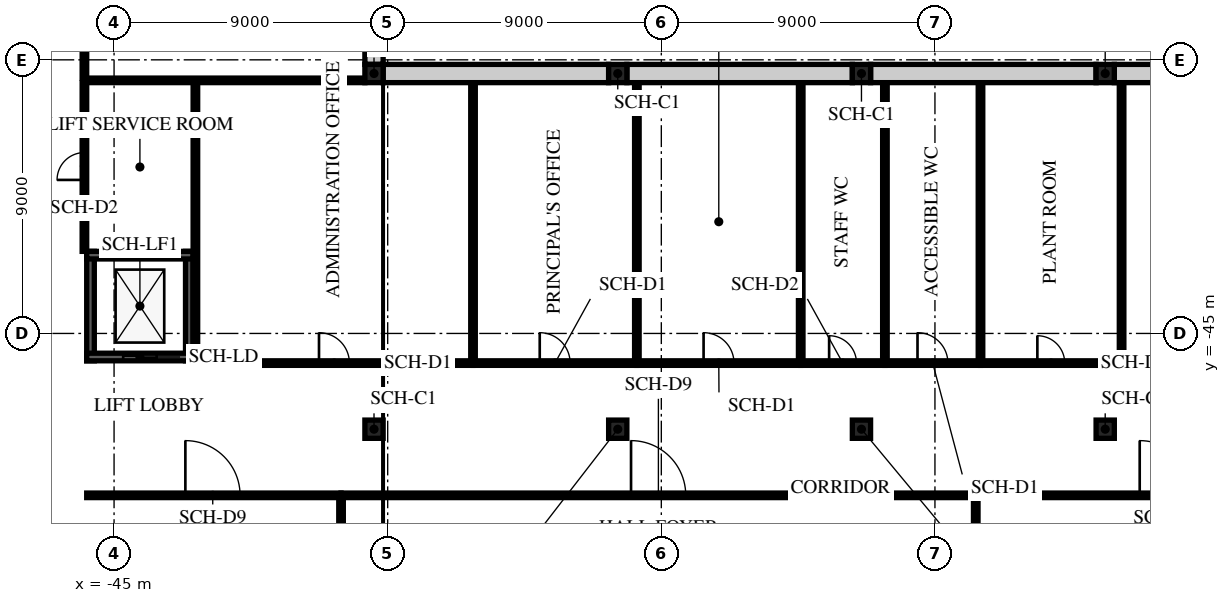
"""IFC4 building model, lengths in metres.
Left out: names, types, materials, properties, quantities, classifications, styles, units other than length and angle.
Written with IfcOpenShell. Run it as: python <this file> out.ifc"""

import sys

from ifc_helpers import new_model, si_unit, direction, frame, frame_2d, origin, origin_2d, place, context, subcontext, project, spatial, rectangle, extrude, element, fill, save


model = new_model("IFC4")
c1 = context("Model", 3, precision=1e-05, world=origin(), true_north=direction((0.0, 1.0)))
c2 = subcontext(c1, "Body", "Model", "MODEL_VIEW")
j1 = project(units=[si_unit("LENGTHUNIT", "METRE"), si_unit("PLANEANGLEUNIT", "RADIAN")], contexts=[c1])
p1 = place(None, origin())
s1 = spatial("IfcSite", under=j1, at=p1, CompositionType="ELEMENT")
p2 = place(p1, origin())
s2 = spatial("IfcBuilding", under=s1, at=p2, CompositionType="ELEMENT")
p3 = place(p2, origin())
s3 = spatial("IfcBuildingStorey", under=s2, at=p3, CompositionType="ELEMENT", Elevation=0.0)
p4 = place(p3, frame((-18.0, -36.0, 0.0), z_axis=(0.0, 0.0, 1.0), x_axis=(0.0, 1.0, 0.0)))
e1 = element("IfcWall", 1, at=p4, inside=s3, PredefinedType="PARTITIONING", context=c2, shape_type="SweptSolid", body=[
    extrude(rectangle(XDim=0.9, YDim=0.1, at=frame_2d((0.45, 0.0))), origin(), (0.0, 0.0, 1.0), 4.1),
])
p5 = place(p3, frame((-13.5, -36.0, 0.0), z_axis=(0.0, 0.0, 1.0), x_axis=(0.0, 1.0, 0.0)))
e2 = element("IfcWall", 2, at=p5, inside=s3, PredefinedType="PARTITIONING", context=c2, shape_type="SweptSolid", body=[
    extrude(rectangle(XDim=17.925, YDim=0.1, at=frame_2d((8.962, 0.0))), origin(), (0.0, 0.0, 1.0), 4.1),
])
for number, where, z_axis, x_axis in (
    (3, (-45.775, -45.9, -1.5), (0.0, 0.0, 1.0), (0.0, 1.0, 0.0)),
    (4, (-42.525, -45.9, -1.5), (0.0, 0.0, 1.0), (0.0, 1.0, 0.0)),
):
    element("IfcWall", number, at=place(p3, frame(where, z_axis=z_axis, x_axis=x_axis)), inside=s3, PredefinedType="SHEAR", context=c2, shape_type="SweptSolid", body=[
        extrude(rectangle(XDim=3.6, YDim=0.25, at=frame_2d((1.8, 0.0))), origin(), (0.0, 0.0, 1.0), 6.0),
    ])
p6 = place(p3, frame((-45.9, -42.425, -1.5), z_axis=(0.0, 0.0, 1.0), x_axis=(1.0, 0.0, 0.0)))
e5 = element("IfcWall", 5, at=p6, inside=s3, PredefinedType="SHEAR", context=c2, shape_type="SweptSolid", body=[
    extrude(rectangle(XDim=3.5, YDim=0.25, at=frame_2d((1.75, 0.0))), origin(), (0.0, 0.0, 1.0), 6.0),
])
p7 = place(p3, frame((-45.9, -45.775, -1.5), z_axis=(0.0, 0.0, 1.0), x_axis=(1.0, 0.0, 0.0)))
e6 = element("IfcWall", 6, at=p7, inside=s3, PredefinedType="SHEAR", context=c2, shape_type="SweptSolid", body=[
    extrude(rectangle(XDim=3.5, YDim=0.25, at=frame_2d((1.75, 0.0))), origin(), (0.0, 0.0, 1.0), 6.0),
])
p8 = place(p7, frame((1.2, 0.0, 1.5)))
e7 = element("IfcOpeningElement", 7, at=p8, cuts=e6, PredefinedType="OPENING", context=c2, shape_type="SweptSolid", body=[
    extrude(rectangle(XDim=1.1, YDim=2.1, at=frame_2d((0.55, 1.05))), frame((0.0, 0.135, 0.0), z_axis=(0.0, -1.0, 0.0), x_axis=(1.0, 0.0, 0.0)), (0.0, 0.0, 1.0), 0.27),
])
for number, where, z_axis, x_axis in (
    (8, (-36.45, -48.15, -0.2), (0.0, 0.0, 1.0), (1.0, 0.0, 0.0)),
    (9, (-36.45, -36.45, -0.2), (0.0, 0.0, 1.0), (1.0, 0.0, 0.0)),
    (10, (-28.433, -48.15, -0.2), (0.0, 0.0, 1.0), (1.0, 0.0, 0.0)),
    (11, (-28.433, -36.45, -0.2), (0.0, 0.0, 1.0), (1.0, 0.0, 0.0)),
    (12, (-20.417, -48.15, -0.2), (0.0, 0.0, 1.0), (1.0, 0.0, 0.0)),
    (13, (-20.417, -36.45, -0.2), (0.0, 0.0, 1.0), (1.0, 0.0, 0.0)),
    (14, (-12.4, -48.15, -0.2), (0.0, 0.0, 1.0), (1.0, 0.0, 0.0)),
    (15, (-12.4, -36.45, -0.2), (0.0, 0.0, 1.0), (1.0, 0.0, 0.0)),
):
    element("IfcColumn", number, at=place(p3, frame(where, z_axis=z_axis, x_axis=x_axis)), inside=s3, PredefinedType="COLUMN", context=c2, shape_type="SweptSolid", body=[
        extrude(rectangle(XDim=0.6, YDim=0.6, at=origin_2d()), origin(), (0.0, 0.0, 1.0), 4.7),
    ])
p9 = place(p3, frame((-45.975, -36.6, 0.0), z_axis=(0.0, 0.0, 1.0), x_axis=(0.0, 1.0, 0.0)))
e16 = element("IfcWall", 16, at=p9, inside=s3, PredefinedType="PARTITIONING", context=c2, shape_type="SweptSolid", body=[
    extrude(rectangle(XDim=7.087, YDim=0.15, at=frame_2d((3.543, 0.0))), origin(), (0.0, 0.0, 1.0), 4.1),
])
p10 = place(p9, frame((3.056, 0.0, 0.0)))
e17 = element("IfcOpeningElement", 17, at=p10, cuts=e16, PredefinedType="OPENING", context=c2, shape_type="SweptSolid", body=[
    extrude(rectangle(XDim=0.9, YDim=2.1, at=frame_2d((0.45, 1.05))), frame((0.0, 0.085, 0.0), z_axis=(0.0, -1.0, 0.0), x_axis=(1.0, 0.0, 0.0)), (0.0, 0.0, 1.0), 0.17),
])
for number, where, z_axis, x_axis in (
    (18, (-37.534, -59.55, 0.0), (0.0, 0.0, 1.0), (0.0, 1.0, 0.0)),
    (19, (-16.658, -59.55, 0.0), (0.0, 0.0, 1.0), (0.0, 1.0, 0.0)),
):
    element("IfcWall", number, at=place(p3, frame(where, z_axis=z_axis, x_axis=x_axis)), inside=s3, PredefinedType="PARTITIONING", context=c2, shape_type="SweptSolid", body=[
        extrude(rectangle(XDim=9.15, YDim=0.15, at=frame_2d((4.575, 0.0))), origin(), (0.0, 0.0, 1.0), 4.1),
    ])
p11 = place(p3, frame((-45.9, -50.325, 0.0), z_axis=(0.0, 0.0, 1.0), x_axis=(1.0, 0.0, 0.0)))
e20 = element("IfcWall", 20, at=p11, inside=s3, PredefinedType="PARTITIONING", context=c2, shape_type="SweptSolid", body=[
    extrude(rectangle(XDim=8.365, YDim=0.15, at=frame_2d((4.183, 0.0))), origin(), (0.0, 0.0, 1.0), 4.1),
])
p12 = place(p11, frame((3.245, 0.0, 0.0)))
e21 = element("IfcOpeningElement", 21, at=p12, cuts=e20, PredefinedType="OPENING", context=c2, shape_type="SweptSolid", body=[
    extrude(rectangle(XDim=1.8, YDim=2.4, at=frame_2d((0.9, 1.2))), frame((0.0, 0.085, 0.0), z_axis=(0.0, -1.0, 0.0), x_axis=(1.0, 0.0, 0.0)), (0.0, 0.0, 1.0), 0.17),
])
p13 = place(p3, frame((-37.534, -50.325, 0.0), z_axis=(0.0, 0.0, 1.0), x_axis=(1.0, 0.0, 0.0)))
e22 = element("IfcWall", 22, at=p13, inside=s3, PredefinedType="PARTITIONING", context=c2, shape_type="SweptSolid", body=[
    extrude(rectangle(XDim=20.876, YDim=0.15, at=frame_2d((10.438, 0.0))), origin(), (0.0, 0.0, 1.0), 4.1),
])
p14 = place(p13, frame((9.538, 0.0, 0.0)))
e23 = element("IfcOpeningElement", 23, at=p14, cuts=e22, PredefinedType="OPENING", context=c2, shape_type="SweptSolid", body=[
    extrude(rectangle(XDim=1.8, YDim=2.4, at=frame_2d((0.9, 1.2))), frame((0.0, 0.085, 0.0), z_axis=(0.0, -1.0, 0.0), x_axis=(1.0, 0.0, 0.0)), (0.0, 0.0, 1.0), 0.17),
])
p15 = place(p3, frame((-16.658, -50.325, 0.0), z_axis=(0.0, 0.0, 1.0), x_axis=(1.0, 0.0, 0.0)))
e24 = element("IfcWall", 24, at=p15, inside=s3, PredefinedType="PARTITIONING", context=c2, shape_type="SweptSolid", body=[
    extrude(rectangle(XDim=12.636, YDim=0.15, at=frame_2d((6.318, 0.0))), origin(), (0.0, 0.0, 1.0), 4.1),
])
p16 = place(p15, frame((5.393, 0.0, 0.0)))
e25 = element("IfcOpeningElement", 25, at=p16, cuts=e24, PredefinedType="OPENING", context=c2, shape_type="SweptSolid", body=[
    extrude(rectangle(XDim=1.8, YDim=2.4, at=frame_2d((0.9, 1.2))), frame((0.0, 0.085, 0.0), z_axis=(0.0, -1.0, 0.0), x_axis=(1.0, 0.0, 0.0)), (0.0, 0.0, 1.0), 0.17),
])
for number, where, z_axis, x_axis in (
    (26, (-33.194, -45.9, 0.0), (0.0, 0.0, 1.0), (0.0, 1.0, 0.0)),
    (27, (-27.804, -45.9, 0.0), (0.0, 0.0, 1.0), (0.0, 1.0, 0.0)),
    (28, (-22.415, -45.9, 0.0), (0.0, 0.0, 1.0), (0.0, 1.0, 0.0)),
    (29, (-19.646, -45.9, 0.0), (0.0, 0.0, 1.0), (0.0, 1.0, 0.0)),
    (30, (-16.502, -45.9, 0.0), (0.0, 0.0, 1.0), (0.0, 1.0, 0.0)),
    (31, (-11.861, -45.9, 0.0), (0.0, 0.0, 1.0), (0.0, 1.0, 0.0)),
):
    element("IfcWall", number, at=place(p3, frame(where, z_axis=z_axis, x_axis=x_axis)), inside=s3, PredefinedType="PARTITIONING", context=c2, shape_type="SweptSolid", body=[
        extrude(rectangle(XDim=9.15, YDim=0.15, at=frame_2d((4.575, 0.0))), origin(), (0.0, 0.0, 1.0), 4.1),
    ])
p17 = place(p3, frame((-42.25, -45.975, 0.0), z_axis=(0.0, 0.0, 1.0), x_axis=(1.0, 0.0, 0.0)))
e32 = element("IfcWall", 32, at=p17, inside=s3, PredefinedType="PARTITIONING", context=c2, shape_type="SweptSolid", body=[
    extrude(rectangle(XDim=9.056, YDim=0.15, at=frame_2d((4.528, 0.0))), origin(), (0.0, 0.0, 1.0), 4.1),
])
p18 = place(p17, frame((3.991, 0.0, 0.0)))
e33 = element("IfcOpeningElement", 33, at=p18, cuts=e32, PredefinedType="OPENING", context=c2, shape_type="SweptSolid", body=[
    extrude(rectangle(XDim=1.0, YDim=2.1, at=frame_2d((0.5, 1.05))), frame((0.0, 0.085, 0.0), z_axis=(0.0, -1.0, 0.0), x_axis=(1.0, 0.0, 0.0)), (0.0, 0.0, 1.0), 0.17),
])
p19 = place(p3, frame((-33.194, -45.975, 0.0), z_axis=(0.0, 0.0, 1.0), x_axis=(1.0, 0.0, 0.0)))
e34 = element("IfcWall", 34, at=p19, inside=s3, PredefinedType="PARTITIONING", context=c2, shape_type="SweptSolid", body=[
    extrude(rectangle(XDim=5.389, YDim=0.15, at=frame_2d((2.695, 0.0))), origin(), (0.0, 0.0, 1.0), 4.1),
])
p20 = place(p19, frame((2.195, 0.0, 0.0)))
e35 = element("IfcOpeningElement", 35, at=p20, cuts=e34, PredefinedType="OPENING", context=c2, shape_type="SweptSolid", body=[
    extrude(rectangle(XDim=1.0, YDim=2.1, at=frame_2d((0.5, 1.05))), frame((0.0, 0.085, 0.0), z_axis=(0.0, -1.0, 0.0), x_axis=(1.0, 0.0, 0.0)), (0.0, 0.0, 1.0), 0.17),
])
p21 = place(p3, frame((-27.804, -45.975, 0.0), z_axis=(0.0, 0.0, 1.0), x_axis=(1.0, 0.0, 0.0)))
e36 = element("IfcWall", 36, at=p21, inside=s3, PredefinedType="PARTITIONING", context=c2, shape_type="SweptSolid", body=[
    extrude(rectangle(XDim=5.389, YDim=0.15, at=frame_2d((2.695, 0.0))), origin(), (0.0, 0.0, 1.0), 4.1),
])
p22 = place(p21, frame((2.195, 0.0, 0.0)))
e37 = element("IfcOpeningElement", 37, at=p22, cuts=e36, PredefinedType="OPENING", context=c2, shape_type="SweptSolid", body=[
    extrude(rectangle(XDim=1.0, YDim=2.1, at=frame_2d((0.5, 1.05))), frame((0.0, 0.085, 0.0), z_axis=(0.0, -1.0, 0.0), x_axis=(1.0, 0.0, 0.0)), (0.0, 0.0, 1.0), 0.17),
])
p23 = place(p3, frame((-22.415, -45.975, 0.0), z_axis=(0.0, 0.0, 1.0), x_axis=(1.0, 0.0, 0.0)))
e38 = element("IfcWall", 38, at=p23, inside=s3, PredefinedType="PARTITIONING", context=c2, shape_type="SweptSolid", body=[
    extrude(rectangle(XDim=2.77, YDim=0.15, at=frame_2d((1.385, 0.0))), origin(), (0.0, 0.0, 1.0), 4.1),
])
p24 = place(p23, frame((0.935, 0.0, 0.0)))
e39 = element("IfcOpeningElement", 39, at=p24, cuts=e38, PredefinedType="OPENING", context=c2, shape_type="SweptSolid", body=[
    extrude(rectangle(XDim=0.9, YDim=2.1, at=frame_2d((0.45, 1.05))), frame((0.0, 0.085, 0.0), z_axis=(0.0, -1.0, 0.0), x_axis=(1.0, 0.0, 0.0)), (0.0, 0.0, 1.0), 0.17),
])
p25 = place(p3, frame((-19.646, -45.975, 0.0), z_axis=(0.0, 0.0, 1.0), x_axis=(1.0, 0.0, 0.0)))
e40 = element("IfcWall", 40, at=p25, inside=s3, PredefinedType="PARTITIONING", context=c2, shape_type="SweptSolid", body=[
    extrude(rectangle(XDim=3.144, YDim=0.15, at=frame_2d((1.572, 0.0))), origin(), (0.0, 0.0, 1.0), 4.1),
])
p26 = place(p25, frame((1.072, 0.0, 0.0)))
e41 = element("IfcOpeningElement", 41, at=p26, cuts=e40, PredefinedType="OPENING", context=c2, shape_type="SweptSolid", body=[
    extrude(rectangle(XDim=1.0, YDim=2.1, at=frame_2d((0.5, 1.05))), frame((0.0, 0.085, 0.0), z_axis=(0.0, -1.0, 0.0), x_axis=(1.0, 0.0, 0.0)), (0.0, 0.0, 1.0), 0.17),
])
p27 = place(p3, frame((-16.502, -45.975, 0.0), z_axis=(0.0, 0.0, 1.0), x_axis=(1.0, 0.0, 0.0)))
e42 = element("IfcWall", 42, at=p27, inside=s3, PredefinedType="PARTITIONING", context=c2, shape_type="SweptSolid", body=[
    extrude(rectangle(XDim=4.641, YDim=0.15, at=frame_2d((2.32, 0.0))), origin(), (0.0, 0.0, 1.0), 4.1),
])
p28 = place(p27, frame((1.87, 0.0, 0.0)))
e43 = element("IfcOpeningElement", 43, at=p28, cuts=e42, PredefinedType="OPENING", context=c2, shape_type="SweptSolid", body=[
    extrude(rectangle(XDim=0.9, YDim=2.1, at=frame_2d((0.45, 1.05))), frame((0.0, 0.085, 0.0), z_axis=(0.0, -1.0, 0.0), x_axis=(1.0, 0.0, 0.0)), (0.0, 0.0, 1.0), 0.17),
])
p29 = place(p3, frame((-11.861, -45.975, 0.0), z_axis=(0.0, 0.0, 1.0), x_axis=(1.0, 0.0, 0.0)))
e44 = element("IfcWall", 44, at=p29, inside=s3, PredefinedType="PARTITIONING", context=c2, shape_type="SweptSolid", body=[
    extrude(rectangle(XDim=10.628, YDim=0.15, at=frame_2d((5.314, 0.0))), origin(), (0.0, 0.0, 1.0), 4.1),
])
p30 = place(p29, frame((4.714, 0.0, 0.0)))
e45 = element("IfcOpeningElement", 45, at=p30, cuts=e44, PredefinedType="OPENING", context=c2, shape_type="SweptSolid", body=[
    extrude(rectangle(XDim=1.2, YDim=2.1, at=frame_2d((0.6, 1.05))), frame((0.0, 0.085, 0.0), z_axis=(0.0, -1.0, 0.0), x_axis=(1.0, 0.0, 0.0)), (0.0, 0.0, 1.0), 0.17),
])
p31 = place(p3, frame((-36.45, -29.236, -0.2), z_axis=(0.0, 0.0, 1.0), x_axis=(0.0, -1.0, 0.0)))
e46 = element("IfcWall", 46, at=p31, inside=s3, PredefinedType="STANDARD", context=c2, shape_type="SweptSolid", body=[
    extrude(rectangle(XDim=6.914, YDim=0.6, at=frame_2d((3.457, 0.0))), origin(), (0.0, 0.0, 1.0), 4.3),
])
for number, where, z_axis, x_axis in (
    (47, (-36.15, -36.45, -0.2), (0.0, 0.0, 1.0), (1.0, 0.0, 0.0)),
    (48, (-28.133, -36.45, -0.2), (0.0, 0.0, 1.0), (1.0, 0.0, 0.0)),
):
    element("IfcWall", number, at=place(p3, frame(where, z_axis=z_axis, x_axis=x_axis)), inside=s3, PredefinedType="STANDARD", context=c2, shape_type="SweptSolid", body=[
        extrude(rectangle(XDim=7.417, YDim=0.6, at=frame_2d((3.708, 0.0))), origin(), (0.0, 0.0, 1.0), 4.3),
    ])
for number, where, z_axis, x_axis in (
    (49, (-20.117, -36.45, -0.2), (0.0, 0.0, 1.0), (1.0, 0.0, 0.0)),
    (50, (-12.1, -36.45, -0.2), (0.0, 0.0, 1.0), (1.0, 0.0, 0.0)),
):
    element("IfcWall", number, at=place(p3, frame(where, z_axis=z_axis, x_axis=x_axis)), inside=s3, PredefinedType="STANDARD", context=c2, shape_type="SweptSolid", body=[
        extrude(rectangle(XDim=7.417, YDim=0.6, at=frame_2d((3.708, 0.0))), origin(), (0.0, 0.0, 1.0), 4.3),
    ])
for number, where, z_axis, x_axis in (
    (51, (-45.9, -36.675, 0.0), (0.0, 0.0, 1.0), (1.0, 0.0, 0.0)),
    (52, (-42.325, -45.9, 0.0), (0.0, 0.0, 1.0), (0.0, 1.0, 0.0)),
):
    element("IfcWall", number, at=place(p3, frame(where, z_axis=z_axis, x_axis=x_axis)), inside=s3, PredefinedType="PARTITIONING", context=c2, shape_type="SweptSolid", body=[
        extrude(rectangle(XDim=9.15, YDim=0.15, at=frame_2d((4.575, 0.0))), origin(), (0.0, 0.0, 1.0), 4.1),
    ])
p32 = place(p3, frame((-45.975, -42.3, 0.0), z_axis=(0.0, 0.0, 1.0), x_axis=(0.0, 1.0, 0.0)))
e53 = element("IfcWall", 53, at=p32, inside=s3, PredefinedType="PARTITIONING", context=c2, shape_type="SweptSolid", body=[
    extrude(rectangle(XDim=5.55, YDim=0.15, at=frame_2d((2.775, 0.0))), origin(), (0.0, 0.0, 1.0), 4.1),
])
p33 = place(p32, frame((2.35, 0.0, 0.0)))
e54 = element("IfcOpeningElement", 54, at=p33, cuts=e53, PredefinedType="OPENING", context=c2, shape_type="SweptSolid", body=[
    extrude(rectangle(XDim=0.9, YDim=2.1, at=frame_2d((0.45, 1.05))), frame((0.0, 0.085, 0.0), z_axis=(0.0, -1.0, 0.0), x_axis=(1.0, 0.0, 0.0)), (0.0, 0.0, 1.0), 0.17),
])
p34 = place(p3, frame((-30.876, -35.7, 0.0), z_axis=(0.0, 0.0, 1.0), x_axis=(1.0, 0.0, 0.0)))
e55 = element("IfcWall", 55, at=p34, inside=s3, PredefinedType="STANDARD", context=c2, shape_type="SweptSolid", body=[
    extrude(rectangle(XDim=61.751, YDim=0.6, at=frame_2d((30.876, 0.0))), origin(), (0.0, 0.0, 1.0), 4.1),
])
p35 = place(p3, frame((-35.7, -30.876, 0.0), z_axis=(0.0, 0.0, 1.0), x_axis=(0.707106781187, -0.707106781187, 0.0)))
e56 = element("IfcWall", 56, at=p35, inside=s3, PredefinedType="STANDARD", context=c2, shape_type="SweptSolid", body=[
    extrude(rectangle(XDim=6.823, YDim=0.6, at=frame_2d((3.411, 0.0))), origin(), (0.0, 0.0, 1.0), 4.1),
])
p36 = place(p8, origin())
e57 = element("IfcDoor", 57, at=p36, inside=s3, OperationType="DOUBLE_DOOR_SLIDING", PredefinedType="DOOR", context=c2, shape_type="SweptSolid", body=[
    extrude(rectangle(XDim=1.1, YDim=2.1, at=frame_2d((0.55, 1.05))), frame((0.0, 0.025, 0.0), z_axis=(0.0, -1.0, 0.0), x_axis=(1.0, 0.0, 0.0)), (0.0, 0.0, 1.0), 0.05),
])
fill(e7, e57)
p37 = place(p12, origin())
e58 = element("IfcDoor", 58, at=p37, inside=s3, OperationType="DOUBLE_DOOR_SINGLE_SWING", PredefinedType="DOOR", context=c2, shape_type="SweptSolid", body=[
    extrude(rectangle(XDim=1.8, YDim=2.4, at=frame_2d((0.9, 1.2))), frame((0.0, 0.025, 0.0), z_axis=(0.0, -1.0, 0.0), x_axis=(1.0, 0.0, 0.0)), (0.0, 0.0, 1.0), 0.05),
])
fill(e21, e58)
p38 = place(p14, origin())
e59 = element("IfcDoor", 59, at=p38, inside=s3, OperationType="DOUBLE_DOOR_SINGLE_SWING", PredefinedType="DOOR", context=c2, shape_type="SweptSolid", body=[
    extrude(rectangle(XDim=1.8, YDim=2.4, at=frame_2d((0.9, 1.2))), frame((0.0, 0.025, 0.0), z_axis=(0.0, -1.0, 0.0), x_axis=(1.0, 0.0, 0.0)), (0.0, 0.0, 1.0), 0.05),
])
fill(e23, e59)
p39 = place(p16, origin())
e60 = element("IfcDoor", 60, at=p39, inside=s3, OperationType="DOUBLE_DOOR_SINGLE_SWING", PredefinedType="DOOR", context=c2, shape_type="SweptSolid", body=[
    extrude(rectangle(XDim=1.8, YDim=2.4, at=frame_2d((0.9, 1.2))), frame((0.0, 0.025, 0.0), z_axis=(0.0, -1.0, 0.0), x_axis=(1.0, 0.0, 0.0)), (0.0, 0.0, 1.0), 0.05),
])
fill(e25, e60)
p40 = place(p18, origin())
e61 = element("IfcDoor", 61, at=p40, inside=s3, OperationType="SINGLE_SWING_LEFT", PredefinedType="DOOR", context=c2, shape_type="SweptSolid", body=[
    extrude(rectangle(XDim=1.0, YDim=2.1, at=frame_2d((0.5, 1.05))), frame((0.0, 0.025, 0.0), z_axis=(0.0, -1.0, 0.0), x_axis=(1.0, 0.0, 0.0)), (0.0, 0.0, 1.0), 0.05),
])
fill(e33, e61)
p41 = place(p20, origin())
e62 = element("IfcDoor", 62, at=p41, inside=s3, OperationType="SINGLE_SWING_RIGHT", PredefinedType="DOOR", context=c2, shape_type="SweptSolid", body=[
    extrude(rectangle(XDim=1.0, YDim=2.1, at=frame_2d((0.5, 1.05))), frame((0.0, 0.025, 0.0), z_axis=(0.0, -1.0, 0.0), x_axis=(1.0, 0.0, 0.0)), (0.0, 0.0, 1.0), 0.05),
])
fill(e35, e62)
p42 = place(p22, origin())
e63 = element("IfcDoor", 63, at=p42, inside=s3, OperationType="SINGLE_SWING_LEFT", PredefinedType="DOOR", context=c2, shape_type="SweptSolid", body=[
    extrude(rectangle(XDim=1.0, YDim=2.1, at=frame_2d((0.5, 1.05))), frame((0.0, 0.025, 0.0), z_axis=(0.0, -1.0, 0.0), x_axis=(1.0, 0.0, 0.0)), (0.0, 0.0, 1.0), 0.05),
])
fill(e37, e63)
p43 = place(p24, origin())
e64 = element("IfcDoor", 64, at=p43, inside=s3, OperationType="SINGLE_SWING_RIGHT", PredefinedType="DOOR", context=c2, shape_type="SweptSolid", body=[
    extrude(rectangle(XDim=0.9, YDim=2.1, at=frame_2d((0.45, 1.05))), frame((0.0, 0.025, 0.0), z_axis=(0.0, -1.0, 0.0), x_axis=(1.0, 0.0, 0.0)), (0.0, 0.0, 1.0), 0.05),
])
fill(e39, e64)
p44 = place(p26, origin())
e65 = element("IfcDoor", 65, at=p44, inside=s3, OperationType="SINGLE_SWING_LEFT", PredefinedType="DOOR", context=c2, shape_type="SweptSolid", body=[
    extrude(rectangle(XDim=1.0, YDim=2.1, at=frame_2d((0.5, 1.05))), frame((0.0, 0.025, 0.0), z_axis=(0.0, -1.0, 0.0), x_axis=(1.0, 0.0, 0.0)), (0.0, 0.0, 1.0), 0.05),
])
fill(e41, e65)
p45 = place(p28, origin())
e66 = element("IfcDoor", 66, at=p45, inside=s3, OperationType="SINGLE_SWING_RIGHT", PredefinedType="DOOR", context=c2, shape_type="SweptSolid", body=[
    extrude(rectangle(XDim=0.9, YDim=2.1, at=frame_2d((0.45, 1.05))), frame((0.0, 0.025, 0.0), z_axis=(0.0, -1.0, 0.0), x_axis=(1.0, 0.0, 0.0)), (0.0, 0.0, 1.0), 0.05),
])
fill(e43, e66)
p46 = place(p33, origin())
e67 = element("IfcDoor", 67, at=p46, inside=s3, OperationType="SINGLE_SWING_RIGHT", PredefinedType="DOOR", context=c2, shape_type="SweptSolid", body=[
    extrude(rectangle(XDim=0.9, YDim=2.1, at=frame_2d((0.45, 1.05))), frame((0.0, 0.025, 0.0), z_axis=(0.0, -1.0, 0.0), x_axis=(1.0, 0.0, 0.0)), (0.0, 0.0, 1.0), 0.05),
])
fill(e54, e67)
save(model, sys.argv[1])
